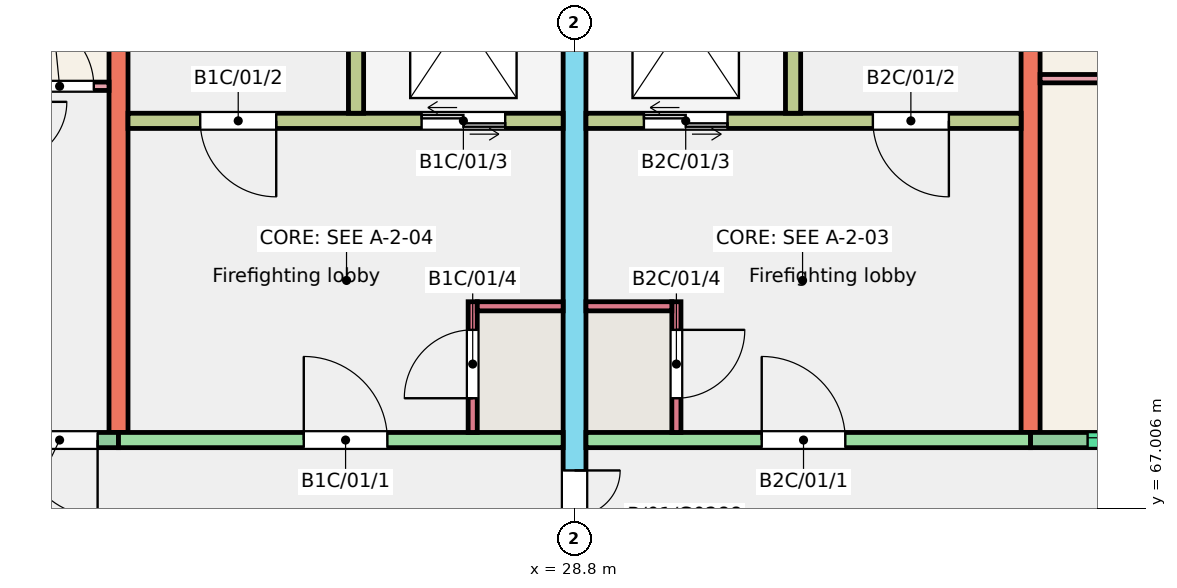
"""IFC4 building model, lengths in metres.
Left out: names, types, materials, properties, quantities, classifications, styles, units other than length and angle.
Written with IfcOpenShell. Run it as: python <this file> out.ifc"""

import sys

from ifc_helpers import new_model, si_unit, direction, frame, frame_2d, origin, place, context, subcontext, project, spatial, rectangle, extrude, element, fill, save


model = new_model("IFC4")
c1 = context("Model", 3, precision=1e-05, world=origin(), true_north=direction((0.0, 1.0)))
c2 = subcontext(c1, "Body", "Model", "MODEL_VIEW")
j1 = project(units=[si_unit("LENGTHUNIT", "METRE"), si_unit("PLANEANGLEUNIT", "RADIAN")], contexts=[c1])
p1 = place(None, origin())
s1 = spatial("IfcSite", under=j1, at=p1, CompositionType="ELEMENT")
p2 = place(p1, origin())
s2 = spatial("IfcBuilding", under=s1, at=p2, CompositionType="ELEMENT")
p3 = place(p2, frame((0.0, 0.0, 3.0)))
s3 = spatial("IfcBuildingStorey", under=s2, at=p3, CompositionType="ELEMENT", Elevation=3.0)
p4 = place(p3, frame((22.8, 68.0, 0.0), z_axis=(0.0, 0.0, 1.0), x_axis=(0.0, 1.0, 0.0)))
e1 = element("IfcWall", 1, at=p4, inside=s3, PredefinedType="SHEAR", context=c2, shape_type="SweptSolid", body=[
    extrude(rectangle(XDim=9.0, YDim=0.25, at=frame_2d((4.5, 0.0))), origin(), (0.0, 0.0, 1.0), 3.0),
])
p5 = place(p3, frame((28.8, 66.0, 0.0), z_axis=(0.0, 0.0, 1.0), x_axis=(0.0, 1.0, 0.0)))
e2 = element("IfcWall", 2, at=p5, inside=s3, PredefinedType="SHEAR", context=c2, shape_type="SweptSolid", body=[
    extrude(rectangle(XDim=11.0, YDim=0.3, at=frame_2d((5.5, 0.0))), origin(), (0.0, 0.0, 1.0), 3.0),
])
p6 = place(p5, frame((0.3, 0.0, 0.0)))
e3 = element("IfcOpeningElement", 3, at=p6, cuts=e2, PredefinedType="OPENING", context=c2, shape_type="SweptSolid", body=[
    extrude(rectangle(XDim=1.2, YDim=2.1, at=frame_2d((0.6, 1.05))), frame((0.0, 0.16, 0.0), z_axis=(0.0, -1.0, 0.0), x_axis=(1.0, 0.0, 0.0)), (0.0, 0.0, 1.0), 0.32),
])
p7 = place(p3, frame((34.8, 68.0, 0.0), z_axis=(0.0, 0.0, 1.0), x_axis=(0.0, 1.0, 0.0)))
e4 = element("IfcWall", 4, at=p7, inside=s3, PredefinedType="SHEAR", context=c2, shape_type="SweptSolid", body=[
    extrude(rectangle(XDim=9.0, YDim=0.25, at=frame_2d((4.5, 0.0))), origin(), (0.0, 0.0, 1.0), 3.0),
])
p8 = place(p3, frame((19.2, 67.9, 0.0), z_axis=(0.0, 0.0, 1.0), x_axis=(1.0, 0.0, 0.0)))
e5 = element("IfcWall", 5, at=p8, inside=s3, PredefinedType="SOLIDWALL", context=c2, shape_type="SweptSolid", body=[
    extrude(rectangle(XDim=3.6, YDim=0.2, at=frame_2d((1.8, 0.0))), origin(), (0.0, 0.0, 1.0), 3.0),
])
p9 = place(p8, frame((0.482, 0.0, 1.1)))
e6 = element("IfcOpeningElement", 6, at=p9, cuts=e5, PredefinedType="OPENING", context=c2, shape_type="SweptSolid", body=[
    extrude(rectangle(XDim=1.2, YDim=1.3, at=frame_2d((0.6, 0.65))), frame((0.0, 0.11, 0.0), z_axis=(0.0, -1.0, 0.0), x_axis=(1.0, 0.0, 0.0)), (0.0, 0.0, 1.0), 0.22),
])
p10 = place(p8, frame((2.325, 0.0, 0.0)))
e7 = element("IfcOpeningElement", 7, at=p10, cuts=e5, PredefinedType="OPENING", context=c2, shape_type="SweptSolid", body=[
    extrude(rectangle(XDim=1.0, YDim=2.1, at=frame_2d((0.5, 1.05))), frame((0.0, 0.11, 0.0), z_axis=(0.0, -1.0, 0.0), x_axis=(1.0, 0.0, 0.0)), (0.0, 0.0, 1.0), 0.22),
])
p11 = place(p3, frame((22.8, 67.9, 0.0), z_axis=(0.0, 0.0, 1.0), x_axis=(1.0, 0.0, 0.0)))
e8 = element("IfcWall", 8, at=p11, inside=s3, PredefinedType="SHEAR", context=c2, shape_type="SweptSolid", body=[
    extrude(rectangle(XDim=5.85, YDim=0.2, at=frame_2d((2.925, 0.0))), origin(), (0.0, 0.0, 1.0), 3.0),
])
p12 = place(p11, frame((2.438, 0.0, 0.0)))
e9 = element("IfcOpeningElement", 9, at=p12, cuts=e8, PredefinedType="OPENING", context=c2, shape_type="SweptSolid", body=[
    extrude(rectangle(XDim=1.1, YDim=2.1, at=frame_2d((0.55, 1.05))), frame((0.0, 0.11, 0.0), z_axis=(0.0, -1.0, 0.0), x_axis=(1.0, 0.0, 0.0)), (0.0, 0.0, 1.0), 0.22),
])
p13 = place(p3, frame((22.925, 72.1, 0.0), z_axis=(0.0, 0.0, 1.0), x_axis=(1.0, 0.0, 0.0)))
e10 = element("IfcWall", 10, at=p13, inside=s3, PredefinedType="SHEAR", context=c2, shape_type="SweptSolid", body=[
    extrude(rectangle(XDim=5.725, YDim=0.2, at=frame_2d((2.862, 0.0))), origin(), (0.0, 0.0, 1.0), 3.0),
])
p14 = place(p13, frame((0.95, 0.0, 0.0)))
e11 = element("IfcOpeningElement", 11, at=p14, cuts=e10, PredefinedType="OPENING", context=c2, shape_type="SweptSolid", body=[
    extrude(rectangle(XDim=1.0, YDim=2.1, at=frame_2d((0.5, 1.05))), frame((0.0, 0.11, 0.0), z_axis=(0.0, -1.0, 0.0), x_axis=(1.0, 0.0, 0.0)), (0.0, 0.0, 1.0), 0.22),
])
p15 = place(p13, frame((3.863, 0.0, 0.0)))
e12 = element("IfcOpeningElement", 12, at=p15, cuts=e10, PredefinedType="OPENING", context=c2, shape_type="SweptSolid", body=[
    extrude(rectangle(XDim=1.1, YDim=2.1, at=frame_2d((0.55, 1.05))), frame((0.0, 0.11, 0.0), z_axis=(0.0, -1.0, 0.0), x_axis=(1.0, 0.0, 0.0)), (0.0, 0.0, 1.0), 0.22),
])
p16 = place(p3, frame((25.925, 72.2, 0.0), z_axis=(0.0, 0.0, 1.0), x_axis=(0.0, 1.0, 0.0)))
e13 = element("IfcWall", 13, at=p16, inside=s3, PredefinedType="SHEAR", context=c2, shape_type="SweptSolid", body=[
    extrude(rectangle(XDim=4.8, YDim=0.2, at=frame_2d((2.4, 0.0))), origin(), (0.0, 0.0, 1.0), 3.0),
])
p17 = place(p3, frame((27.46, 68.0, 0.0), z_axis=(0.0, 0.0, 1.0), x_axis=(0.0, 1.0, 0.0)))
e14 = element("IfcWall", 14, at=p17, inside=s3, PredefinedType="SHEAR", context=c2, shape_type="SweptSolid", body=[
    extrude(rectangle(XDim=1.72, YDim=0.12, at=frame_2d((0.86, 0.0))), origin(), (0.0, 0.0, 1.0), 3.0),
])
p18 = place(p17, frame((0.45, 0.0, 0.0)))
e15 = element("IfcOpeningElement", 15, at=p18, cuts=e14, PredefinedType="OPENING", context=c2, shape_type="SweptSolid", body=[
    extrude(rectangle(XDim=0.9, YDim=2.1, at=frame_2d((0.45, 1.05))), frame((0.0, 0.07, 0.0), z_axis=(0.0, -1.0, 0.0), x_axis=(1.0, 0.0, 0.0)), (0.0, 0.0, 1.0), 0.14),
])
p19 = place(p3, frame((27.52, 69.66, 0.0), z_axis=(0.0, 0.0, 1.0), x_axis=(1.0, 0.0, 0.0)))
e16 = element("IfcWall", 16, at=p19, inside=s3, PredefinedType="SHEAR", context=c2, shape_type="SweptSolid", body=[
    extrude(rectangle(XDim=1.13, YDim=0.12, at=frame_2d((0.565, 0.0))), origin(), (0.0, 0.0, 1.0), 3.0),
])
p20 = place(p3, frame((28.95, 67.9, 0.0), z_axis=(0.0, 0.0, 1.0), x_axis=(1.0, 0.0, 0.0)))
e17 = element("IfcWall", 17, at=p20, inside=s3, PredefinedType="SHEAR", context=c2, shape_type="SweptSolid", body=[
    extrude(rectangle(XDim=5.85, YDim=0.2, at=frame_2d((2.925, 0.0))), origin(), (0.0, 0.0, 1.0), 3.0),
])
p21 = place(p20, frame((2.312, 0.0, 0.0)))
e18 = element("IfcOpeningElement", 18, at=p21, cuts=e17, PredefinedType="OPENING", context=c2, shape_type="SweptSolid", body=[
    extrude(rectangle(XDim=1.1, YDim=2.1, at=frame_2d((0.55, 1.05))), frame((0.0, 0.11, 0.0), z_axis=(0.0, -1.0, 0.0), x_axis=(1.0, 0.0, 0.0)), (0.0, 0.0, 1.0), 0.22),
])
p22 = place(p3, frame((28.95, 72.1, 0.0), z_axis=(0.0, 0.0, 1.0), x_axis=(1.0, 0.0, 0.0)))
e19 = element("IfcWall", 19, at=p22, inside=s3, PredefinedType="SHEAR", context=c2, shape_type="SweptSolid", body=[
    extrude(rectangle(XDim=5.725, YDim=0.2, at=frame_2d((2.863, 0.0))), origin(), (0.0, 0.0, 1.0), 3.0),
])
p23 = place(p22, frame((3.775, 0.0, 0.0)))
e20 = element("IfcOpeningElement", 20, at=p23, cuts=e19, PredefinedType="OPENING", context=c2, shape_type="SweptSolid", body=[
    extrude(rectangle(XDim=1.0, YDim=2.1, at=frame_2d((0.5, 1.05))), frame((0.0, 0.11, 0.0), z_axis=(0.0, -1.0, 0.0), x_axis=(1.0, 0.0, 0.0)), (0.0, 0.0, 1.0), 0.22),
])
p24 = place(p22, frame((0.762, 0.0, 0.0)))
e21 = element("IfcOpeningElement", 21, at=p24, cuts=e19, PredefinedType="OPENING", context=c2, shape_type="SweptSolid", body=[
    extrude(rectangle(XDim=1.1, YDim=2.1, at=frame_2d((0.55, 1.05))), frame((0.0, 0.11, 0.0), z_axis=(0.0, -1.0, 0.0), x_axis=(1.0, 0.0, 0.0)), (0.0, 0.0, 1.0), 0.22),
])
p25 = place(p3, frame((31.675, 72.2, 0.0), z_axis=(0.0, 0.0, 1.0), x_axis=(0.0, 1.0, 0.0)))
e22 = element("IfcWall", 22, at=p25, inside=s3, PredefinedType="SHEAR", context=c2, shape_type="SweptSolid", body=[
    extrude(rectangle(XDim=4.8, YDim=0.2, at=frame_2d((2.4, 0.0))), origin(), (0.0, 0.0, 1.0), 3.0),
])
p26 = place(p3, frame((30.14, 68.0, 0.0), z_axis=(0.0, 0.0, 1.0), x_axis=(0.0, 1.0, 0.0)))
e23 = element("IfcWall", 23, at=p26, inside=s3, PredefinedType="SHEAR", context=c2, shape_type="SweptSolid", body=[
    extrude(rectangle(XDim=1.72, YDim=0.12, at=frame_2d((0.86, 0.0))), origin(), (0.0, 0.0, 1.0), 3.0),
])
p27 = place(p26, frame((0.45, 0.0, 0.0)))
e24 = element("IfcOpeningElement", 24, at=p27, cuts=e23, PredefinedType="OPENING", context=c2, shape_type="SweptSolid", body=[
    extrude(rectangle(XDim=0.9, YDim=2.1, at=frame_2d((0.45, 1.05))), frame((0.0, 0.07, 0.0), z_axis=(0.0, -1.0, 0.0), x_axis=(1.0, 0.0, 0.0)), (0.0, 0.0, 1.0), 0.14),
])
p28 = place(p3, frame((28.95, 69.66, 0.0), z_axis=(0.0, 0.0, 1.0), x_axis=(1.0, 0.0, 0.0)))
e25 = element("IfcWall", 25, at=p28, inside=s3, PredefinedType="SHEAR", context=c2, shape_type="SweptSolid", body=[
    extrude(rectangle(XDim=1.13, YDim=0.12, at=frame_2d((0.565, 0.0))), origin(), (0.0, 0.0, 1.0), 3.0),
])
p29 = place(p3, frame((34.8, 67.9, 0.0), z_axis=(0.0, 0.0, 1.0), x_axis=(1.0, 0.0, 0.0)))
e26 = element("IfcWall", 26, at=p29, inside=s3, PredefinedType="SOLIDWALL", context=c2, shape_type="SweptSolid", body=[
    extrude(rectangle(XDim=3.6, YDim=0.2, at=frame_2d((1.8, 0.0))), origin(), (0.0, 0.0, 1.0), 3.0),
])
p30 = place(p29, frame((0.75, 0.0, 1.2)))
e27 = element("IfcOpeningElement", 27, at=p30, cuts=e26, PredefinedType="OPENING", context=c2, shape_type="SweptSolid", body=[
    extrude(rectangle(XDim=2.1, YDim=1.2, at=frame_2d((1.05, 0.6))), frame((0.0, 0.11, 0.0), z_axis=(0.0, -1.0, 0.0), x_axis=(1.0, 0.0, 0.0)), (0.0, 0.0, 1.0), 0.22),
])
p31 = place(p3, frame((19.3, 72.555, 0.0), z_axis=(0.0, 0.0, 1.0), x_axis=(1.0, 0.0, 0.0)))
e28 = element("IfcWall", 28, at=p31, inside=s3, PredefinedType="PARTITIONING", context=c2, shape_type="SweptSolid", body=[
    extrude(rectangle(XDim=3.375, YDim=0.11, at=frame_2d((1.688, 0.0))), origin(), (0.0, 0.0, 1.0), 2.8),
])
p32 = place(p31, frame((2.275, 0.0, 0.0)))
e29 = element("IfcOpeningElement", 29, at=p32, cuts=e28, PredefinedType="OPENING", context=c2, shape_type="SweptSolid", body=[
    extrude(rectangle(XDim=0.9, YDim=2.1, at=frame_2d((0.45, 1.05))), frame((0.0, 0.065, 0.0), z_axis=(0.0, -1.0, 0.0), x_axis=(1.0, 0.0, 0.0)), (0.0, 0.0, 1.0), 0.13),
])
p33 = place(p3, frame((34.925, 72.655, 0.0), z_axis=(0.0, 0.0, 1.0), x_axis=(1.0, 0.0, 0.0)))
e30 = element("IfcWall", 30, at=p33, inside=s3, PredefinedType="PARTITIONING", context=c2, shape_type="SweptSolid", body=[
    extrude(rectangle(XDim=3.35, YDim=0.11, at=frame_2d((1.675, 0.0))), origin(), (0.0, 0.0, 1.0), 2.8),
])
p34 = place(p30, origin())
e31 = element("IfcWindow", 31, at=p34, inside=s3, PartitioningType="SINGLE_PANEL", PredefinedType="WINDOW", context=c2, shape_type="SweptSolid", body=[
    extrude(rectangle(XDim=2.1, YDim=1.2, at=frame_2d((1.05, 0.6))), frame((0.0, 0.06, 0.0), z_axis=(0.0, -1.0, 0.0), x_axis=(1.0, 0.0, 0.0)), (0.0, 0.0, 1.0), 0.06),
])
fill(e27, e31)
p35 = place(p10, origin())
e32 = element("IfcDoor", 32, at=p35, inside=s3, OperationType="SINGLE_SWING_RIGHT", PredefinedType="DOOR", context=c2, shape_type="SweptSolid", body=[
    extrude(rectangle(XDim=1.0, YDim=2.1, at=frame_2d((0.5, 1.05))), frame((0.0, 0.025, 0.0), z_axis=(0.0, -1.0, 0.0), x_axis=(1.0, 0.0, 0.0)), (0.0, 0.0, 1.0), 0.05),
])
fill(e7, e32)
p36 = place(p32, origin())
e33 = element("IfcDoor", 33, at=p36, inside=s3, OperationType="SINGLE_SWING_LEFT", PredefinedType="DOOR", context=c2, shape_type="SweptSolid", body=[
    extrude(rectangle(XDim=0.9, YDim=2.1, at=frame_2d((0.45, 1.05))), frame((0.0, 0.025, 0.0), z_axis=(0.0, -1.0, 0.0), x_axis=(1.0, 0.0, 0.0)), (0.0, 0.0, 1.0), 0.05),
])
fill(e29, e33)
p37 = place(p12, origin())
e34 = element("IfcDoor", 34, at=p37, inside=s3, OperationType="SINGLE_SWING_LEFT", PredefinedType="DOOR", context=c2, shape_type="SweptSolid", body=[
    extrude(rectangle(XDim=1.1, YDim=2.1, at=frame_2d((0.55, 1.05))), frame((0.0, 0.025, 0.0), z_axis=(0.0, -1.0, 0.0), x_axis=(1.0, 0.0, 0.0)), (0.0, 0.0, 1.0), 0.05),
])
fill(e9, e34)
p38 = place(p14, origin())
e35 = element("IfcDoor", 35, at=p38, inside=s3, OperationType="SINGLE_SWING_RIGHT", PredefinedType="DOOR", context=c2, shape_type="SweptSolid", body=[
    extrude(rectangle(XDim=1.0, YDim=2.1, at=frame_2d((0.5, 1.05))), frame((0.0, 0.025, 0.0), z_axis=(0.0, -1.0, 0.0), x_axis=(1.0, 0.0, 0.0)), (0.0, 0.0, 1.0), 0.05),
])
fill(e11, e35)
p39 = place(p15, origin())
e36 = element("IfcDoor", 36, at=p39, inside=s3, OperationType="DOUBLE_DOOR_SLIDING", PredefinedType="DOOR", context=c2, shape_type="SweptSolid", body=[
    extrude(rectangle(XDim=1.1, YDim=2.1, at=frame_2d((0.55, 1.05))), frame((0.0, 0.025, 0.0), z_axis=(0.0, -1.0, 0.0), x_axis=(1.0, 0.0, 0.0)), (0.0, 0.0, 1.0), 0.05),
])
fill(e12, e36)
p40 = place(p18, origin())
e37 = element("IfcDoor", 37, at=p40, inside=s3, OperationType="SINGLE_SWING_LEFT", PredefinedType="DOOR", context=c2, shape_type="SweptSolid", body=[
    extrude(rectangle(XDim=0.9, YDim=2.1, at=frame_2d((0.45, 1.05))), frame((0.0, 0.025, 0.0), z_axis=(0.0, -1.0, 0.0), x_axis=(1.0, 0.0, 0.0)), (0.0, 0.0, 1.0), 0.05),
])
fill(e15, e37)
p41 = place(p21, origin())
e38 = element("IfcDoor", 38, at=p41, inside=s3, OperationType="SINGLE_SWING_LEFT", PredefinedType="DOOR", context=c2, shape_type="SweptSolid", body=[
    extrude(rectangle(XDim=1.1, YDim=2.1, at=frame_2d((0.55, 1.05))), frame((0.0, 0.025, 0.0), z_axis=(0.0, -1.0, 0.0), x_axis=(1.0, 0.0, 0.0)), (0.0, 0.0, 1.0), 0.05),
])
fill(e18, e38)
p42 = place(p23, origin())
e39 = element("IfcDoor", 39, at=p42, inside=s3, OperationType="SINGLE_SWING_RIGHT", PredefinedType="DOOR", context=c2, shape_type="SweptSolid", body=[
    extrude(rectangle(XDim=1.0, YDim=2.1, at=frame_2d((0.5, 1.05))), frame((0.0, 0.025, 0.0), z_axis=(0.0, -1.0, 0.0), x_axis=(1.0, 0.0, 0.0)), (0.0, 0.0, 1.0), 0.05),
])
fill(e20, e39)
p43 = place(p24, origin())
e40 = element("IfcDoor", 40, at=p43, inside=s3, OperationType="DOUBLE_DOOR_SLIDING", PredefinedType="DOOR", context=c2, shape_type="SweptSolid", body=[
    extrude(rectangle(XDim=1.1, YDim=2.1, at=frame_2d((0.55, 1.05))), frame((0.0, 0.025, 0.0), z_axis=(0.0, -1.0, 0.0), x_axis=(1.0, 0.0, 0.0)), (0.0, 0.0, 1.0), 0.05),
])
fill(e21, e40)
p44 = place(p27, origin())
e41 = element("IfcDoor", 41, at=p44, inside=s3, OperationType="SINGLE_SWING_RIGHT", PredefinedType="DOOR", context=c2, shape_type="SweptSolid", body=[
    extrude(rectangle(XDim=0.9, YDim=2.1, at=frame_2d((0.45, 1.05))), frame((0.0, 0.025, 0.0), z_axis=(0.0, -1.0, 0.0), x_axis=(1.0, 0.0, 0.0)), (0.0, 0.0, 1.0), 0.05),
])
fill(e24, e41)
p45 = place(p6, origin())
e42 = element("IfcDoor", 42, at=p45, inside=s3, OperationType="DOUBLE_DOOR_SINGLE_SWING", PredefinedType="DOOR", context=c2, shape_type="SweptSolid", body=[
    extrude(rectangle(XDim=1.2, YDim=2.1, at=frame_2d((0.6, 1.05))), frame((0.0, 0.025, 0.0), z_axis=(0.0, -1.0, 0.0), x_axis=(1.0, 0.0, 0.0)), (0.0, 0.0, 1.0), 0.05),
])
fill(e3, e42)
save(model, sys.argv[1])
